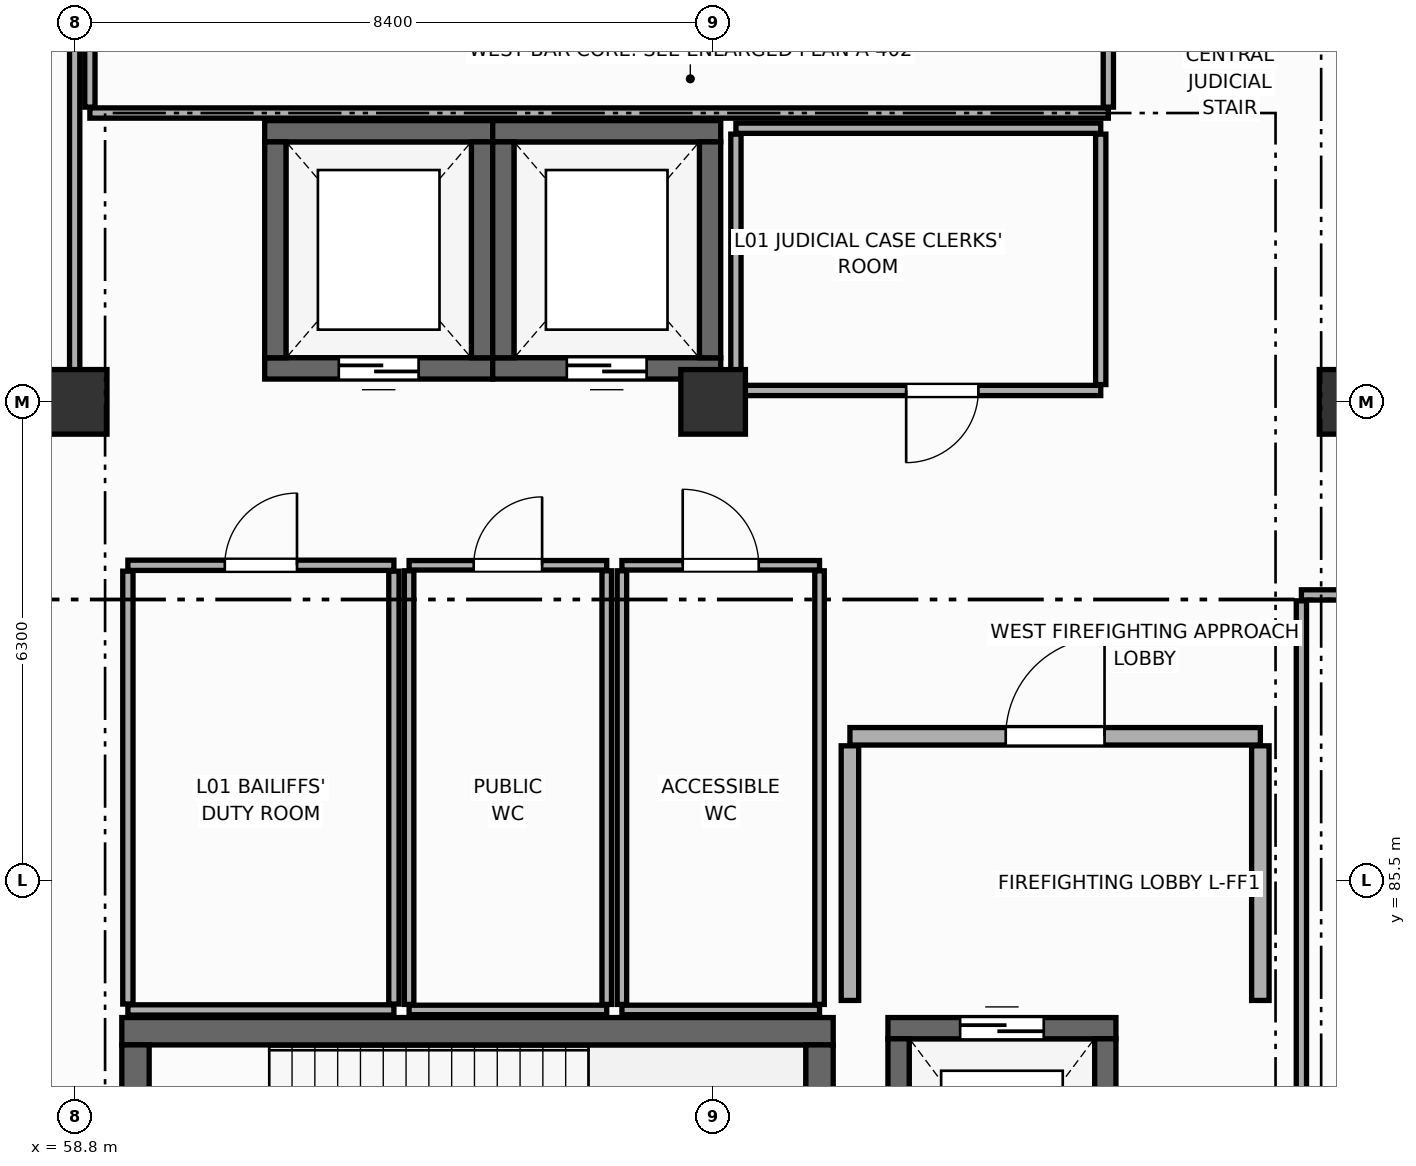
"""IFC4 building model, lengths in metres.
Left out: names, types, materials, properties, quantities, classifications, styles, units other than length and angle.
Written with IfcOpenShell. Run it as: python <this file> out.ifc"""

import sys

from ifc_helpers import new_model, si_unit, direction, frame, frame_2d, origin, origin_2d, place, context, subcontext, project, spatial, rectangle, extrude, element, fill, save


model = new_model("IFC4")
c1 = context("Model", 3, precision=1e-05, world=origin(), true_north=direction((0.0, 1.0)))
c2 = subcontext(c1, "Body", "Model", "MODEL_VIEW")
j1 = project(units=[si_unit("LENGTHUNIT", "METRE"), si_unit("PLANEANGLEUNIT", "RADIAN")], contexts=[c1])
p1 = place(None, origin())
s1 = spatial("IfcSite", under=j1, at=p1, CompositionType="ELEMENT")
p2 = place(p1, origin())
s2 = spatial("IfcBuilding", under=s1, at=p2, CompositionType="ELEMENT")
p3 = place(p2, origin())
s3 = spatial("IfcBuildingStorey", under=s2, at=p3, CompositionType="ELEMENT", Elevation=0.0)
for number, where, z_axis, x_axis in (
    (1, (58.8, 91.8, 0.0), (0.0, 0.0, 1.0), (1.0, 0.0, 0.0)),
    (2, (67.2, 91.8, 0.0), (0.0, 0.0, 1.0), (1.0, 0.0, 0.0)),
    (3, (75.6, 91.8, 0.0), (0.0, 0.0, 1.0), (1.0, 0.0, 0.0)),
):
    element("IfcColumn", number, at=place(p3, frame(where, z_axis=z_axis, x_axis=x_axis)), inside=s3, PredefinedType="COLUMN", context=c2, shape_type="SweptSolid", body=[
        extrude(rectangle(XDim=0.85, YDim=0.85, at=origin_2d()), origin(), (0.0, 0.0, 1.0), 5.4),
    ])
p4 = place(p3, frame((59.42, 83.52, 0.0), z_axis=(0.0, 0.0, 1.0), x_axis=(1.0, 0.0, 0.0)))
e4 = element("IfcWall", 4, at=p4, inside=s3, PredefinedType="SHEAR", context=c2, shape_type="SweptSolid", body=[
    extrude(rectangle(XDim=9.36, YDim=0.36, at=frame_2d((4.68, 0.0))), origin(), (0.0, 0.0, 1.0), 5.14),
])
p5 = place(p3, frame((59.6, 79.98, 0.0), z_axis=(0.0, 0.0, 1.0), x_axis=(0.0, 1.0, 0.0)))
e5 = element("IfcWall", 5, at=p5, inside=s3, PredefinedType="SHEAR", context=c2, shape_type="SweptSolid", body=[
    extrude(rectangle(XDim=3.36, YDim=0.36, at=frame_2d((1.68, 0.0))), origin(), (0.0, 0.0, 1.0), 5.14),
])
p6 = place(p5, frame((1.08, 0.0, 0.0)))
e6 = element("IfcOpeningElement", 6, at=p6, cuts=e5, PredefinedType="OPENING", context=c2, shape_type="SweptSolid", body=[
    extrude(rectangle(XDim=1.2, YDim=2.2, at=frame_2d((0.6, 1.1))), frame((0.0, 0.19, 0.0), z_axis=(0.0, -1.0, 0.0), x_axis=(1.0, 0.0, 0.0)), (0.0, 0.0, 1.0), 0.38),
])
p7 = place(p3, frame((68.6, 83.34, 0.0), z_axis=(0.0, 0.0, 1.0), x_axis=(0.0, -1.0, 0.0)))
e7 = element("IfcWall", 7, at=p7, inside=s3, PredefinedType="SHEAR", context=c2, shape_type="SweptSolid", body=[
    extrude(rectangle(XDim=3.36, YDim=0.36, at=frame_2d((1.68, 0.0))), origin(), (0.0, 0.0, 1.0), 5.14),
])
p8 = place(p3, frame((69.5, 83.56, 0.0), z_axis=(0.0, 0.0, 1.0), x_axis=(1.0, 0.0, 0.0)))
e8 = element("IfcWall", 8, at=p8, inside=s3, PredefinedType="SHEAR", context=c2, shape_type="SweptSolid", body=[
    extrude(rectangle(XDim=3.0, YDim=0.28, at=frame_2d((1.5, 0.0))), origin(), (0.0, 0.0, 1.0), 5.14),
])
p9 = place(p8, frame((0.95, 0.0, 0.0)))
e9 = element("IfcOpeningElement", 9, at=p9, cuts=e8, PredefinedType="OPENING", context=c2, shape_type="SweptSolid", body=[
    extrude(rectangle(XDim=1.1, YDim=2.2, at=frame_2d((0.55, 1.1))), frame((0.0, 0.15, 0.0), z_axis=(0.0, -1.0, 0.0), x_axis=(1.0, 0.0, 0.0)), (0.0, 0.0, 1.0), 0.3),
])
for number, where, z_axis, x_axis in (
    (10, (69.64, 80.18, 0.0), (0.0, 0.0, 1.0), (0.0, 1.0, 0.0)),
    (11, (72.36, 83.42, 0.0), (0.0, 0.0, 1.0), (0.0, -1.0, 0.0)),
):
    element("IfcWall", number, at=place(p3, frame(where, z_axis=z_axis, x_axis=x_axis)), inside=s3, PredefinedType="SHEAR", context=c2, shape_type="SweptSolid", body=[
        extrude(rectangle(XDim=3.24, YDim=0.28, at=frame_2d((1.62, 0.0))), origin(), (0.0, 0.0, 1.0), 5.14),
    ])
p10 = place(p3, frame((61.3, 95.36, 0.0), z_axis=(0.0, 0.0, 1.0), x_axis=(1.0, 0.0, 0.0)))
e12 = element("IfcWall", 12, at=p10, inside=s3, PredefinedType="SHEAR", context=c2, shape_type="SweptSolid", body=[
    extrude(rectangle(XDim=3.0, YDim=0.28, at=frame_2d((1.5, 0.0))), origin(), (0.0, 0.0, 1.0), 5.14),
])
p11 = place(p3, frame((64.3, 92.24, 0.0), z_axis=(0.0, 0.0, 1.0), x_axis=(-1.0, 0.0, 0.0)))
e13 = element("IfcWall", 13, at=p11, inside=s3, PredefinedType="SHEAR", context=c2, shape_type="SweptSolid", body=[
    extrude(rectangle(XDim=3.0, YDim=0.28, at=frame_2d((1.5, 0.0))), origin(), (0.0, 0.0, 1.0), 5.14),
])
p12 = place(p11, frame((0.975, 0.0, 0.0)))
e14 = element("IfcOpeningElement", 14, at=p12, cuts=e13, PredefinedType="OPENING", context=c2, shape_type="SweptSolid", body=[
    extrude(rectangle(XDim=1.05, YDim=2.2, at=frame_2d((0.525, 1.1))), frame((0.0, 0.15, 0.0), z_axis=(0.0, -1.0, 0.0), x_axis=(1.0, 0.0, 0.0)), (0.0, 0.0, 1.0), 0.3),
])
for number, where, z_axis, x_axis in (
    (15, (61.44, 92.38, 0.0), (0.0, 0.0, 1.0), (0.0, 1.0, 0.0)),
    (16, (64.16, 95.22, 0.0), (0.0, 0.0, 1.0), (0.0, -1.0, 0.0)),
):
    element("IfcWall", number, at=place(p3, frame(where, z_axis=z_axis, x_axis=x_axis)), inside=s3, PredefinedType="SHEAR", context=c2, shape_type="SweptSolid", body=[
        extrude(rectangle(XDim=2.84, YDim=0.28, at=frame_2d((1.42, 0.0))), origin(), (0.0, 0.0, 1.0), 5.14),
    ])
p13 = place(p3, frame((64.3, 95.36, 0.0), z_axis=(0.0, 0.0, 1.0), x_axis=(1.0, 0.0, 0.0)))
e17 = element("IfcWall", 17, at=p13, inside=s3, PredefinedType="SHEAR", context=c2, shape_type="SweptSolid", body=[
    extrude(rectangle(XDim=3.0, YDim=0.28, at=frame_2d((1.5, 0.0))), origin(), (0.0, 0.0, 1.0), 5.14),
])
p14 = place(p3, frame((67.3, 92.24, 0.0), z_axis=(0.0, 0.0, 1.0), x_axis=(-1.0, 0.0, 0.0)))
e18 = element("IfcWall", 18, at=p14, inside=s3, PredefinedType="SHEAR", context=c2, shape_type="SweptSolid", body=[
    extrude(rectangle(XDim=3.0, YDim=0.28, at=frame_2d((1.5, 0.0))), origin(), (0.0, 0.0, 1.0), 5.14),
])
p15 = place(p14, frame((0.975, 0.0, 0.0)))
e19 = element("IfcOpeningElement", 19, at=p15, cuts=e18, PredefinedType="OPENING", context=c2, shape_type="SweptSolid", body=[
    extrude(rectangle(XDim=1.05, YDim=2.2, at=frame_2d((0.525, 1.1))), frame((0.0, 0.15, 0.0), z_axis=(0.0, -1.0, 0.0), x_axis=(1.0, 0.0, 0.0)), (0.0, 0.0, 1.0), 0.3),
])
for number, where, z_axis, x_axis in (
    (20, (64.44, 92.38, 0.0), (0.0, 0.0, 1.0), (0.0, 1.0, 0.0)),
    (21, (67.16, 95.22, 0.0), (0.0, 0.0, 1.0), (0.0, -1.0, 0.0)),
):
    element("IfcWall", number, at=place(p3, frame(where, z_axis=z_axis, x_axis=x_axis)), inside=s3, PredefinedType="SHEAR", context=c2, shape_type="SweptSolid", body=[
        extrude(rectangle(XDim=2.84, YDim=0.28, at=frame_2d((1.42, 0.0))), origin(), (0.0, 0.0, 1.0), 5.14),
    ])
p16 = place(p3, frame((69.0, 87.4, 0.0), z_axis=(0.0, 0.0, 1.0), x_axis=(1.0, 0.0, 0.0)))
e22 = element("IfcWall", 22, at=p16, inside=s3, PredefinedType="STANDARD", context=c2, shape_type="SweptSolid", body=[
    extrude(rectangle(XDim=5.4, YDim=0.23, at=frame_2d((2.7, 0.0))), origin(), (0.0, 0.0, 1.0), 5.125),
])
p17 = place(p16, frame((2.05, 0.0, 0.0)))
e23 = element("IfcOpeningElement", 23, at=p17, cuts=e22, PredefinedType="OPENING", context=c2, shape_type="SweptSolid", body=[
    extrude(rectangle(XDim=1.3, YDim=2.2, at=frame_2d((0.65, 1.1))), frame((0.0, 0.125, 0.0), z_axis=(0.0, -1.0, 0.0), x_axis=(1.0, 0.0, 0.0)), (0.0, 0.0, 1.0), 0.25),
])
for number, where, z_axis, x_axis in (
    (24, (69.0, 83.925, 0.0), (0.0, 0.0, 1.0), (0.0, 1.0, 0.0)),
    (25, (74.4, 87.275, 0.0), (0.0, 0.0, 1.0), (0.0, -1.0, 0.0)),
):
    element("IfcWall", number, at=place(p3, frame(where, z_axis=z_axis, x_axis=x_axis)), inside=s3, PredefinedType="STANDARD", context=c2, shape_type="SweptSolid", body=[
        extrude(rectangle(XDim=3.35, YDim=0.23, at=frame_2d((1.675, 0.0))), origin(), (0.0, 0.0, 1.0), 5.125),
    ])
p18 = place(p3, frame((63.2, 89.65, 0.0), z_axis=(0.0, 0.0, 1.0), x_axis=(1.0, 0.0, 0.0)))
e26 = element("IfcWall", 26, at=p18, inside=s3, PredefinedType="PARTITIONING", context=c2, shape_type="SweptSolid", body=[
    extrude(rectangle(XDim=2.6, YDim=0.125, at=frame_2d((1.3, 0.0))), origin(), (0.0, 0.0, 1.0), 5.125),
])
p19 = place(p18, frame((0.85, 0.0, 0.0)))
e27 = element("IfcOpeningElement", 27, at=p19, cuts=e26, PredefinedType="OPENING", context=c2, shape_type="SweptSolid", body=[
    extrude(rectangle(XDim=0.9, YDim=2.1, at=frame_2d((0.45, 1.05))), frame((0.0, 0.073, 0.0), z_axis=(0.0, -1.0, 0.0), x_axis=(1.0, 0.0, 0.0)), (0.0, 0.0, 1.0), 0.145),
])
p20 = place(p3, frame((65.8, 83.8, 0.0), z_axis=(0.0, 0.0, 1.0), x_axis=(-1.0, 0.0, 0.0)))
e28 = element("IfcWall", 28, at=p20, inside=s3, PredefinedType="PARTITIONING", context=c2, shape_type="SweptSolid", body=[
    extrude(rectangle(XDim=2.6, YDim=0.125, at=frame_2d((1.3, 0.0))), origin(), (0.0, 0.0, 1.0), 5.125),
])
for number, where, z_axis, x_axis in (
    (29, (63.2, 83.873, 0.0), (0.0, 0.0, 1.0), (0.0, 1.0, 0.0)),
    (30, (65.8, 89.577, 0.0), (0.0, 0.0, 1.0), (0.0, -1.0, 0.0)),
):
    element("IfcWall", number, at=place(p3, frame(where, z_axis=z_axis, x_axis=x_axis)), inside=s3, PredefinedType="PARTITIONING", context=c2, shape_type="SweptSolid", body=[
        extrude(rectangle(XDim=5.705, YDim=0.125, at=frame_2d((2.853, 0.0))), origin(), (0.0, 0.0, 1.0), 5.125),
    ])
p21 = place(p3, frame((66.0, 89.65, 0.0), z_axis=(0.0, 0.0, 1.0), x_axis=(1.0, 0.0, 0.0)))
e31 = element("IfcWall", 31, at=p21, inside=s3, PredefinedType="PARTITIONING", context=c2, shape_type="SweptSolid", body=[
    extrude(rectangle(XDim=2.6, YDim=0.125, at=frame_2d((1.3, 0.0))), origin(), (0.0, 0.0, 1.0), 4.27),
])
p22 = place(p21, frame((0.8, 0.0, 0.0)))
e32 = element("IfcOpeningElement", 32, at=p22, cuts=e31, PredefinedType="OPENING", context=c2, shape_type="SweptSolid", body=[
    extrude(rectangle(XDim=1.0, YDim=2.1, at=frame_2d((0.5, 1.05))), frame((0.0, 0.073, 0.0), z_axis=(0.0, -1.0, 0.0), x_axis=(1.0, 0.0, 0.0)), (0.0, 0.0, 1.0), 0.145),
])
p23 = place(p3, frame((68.6, 83.8, 0.0), z_axis=(0.0, 0.0, 1.0), x_axis=(-1.0, 0.0, 0.0)))
e33 = element("IfcWall", 33, at=p23, inside=s3, PredefinedType="PARTITIONING", context=c2, shape_type="SweptSolid", body=[
    extrude(rectangle(XDim=2.6, YDim=0.125, at=frame_2d((1.3, 0.0))), origin(), (0.0, 0.0, 1.0), 4.27),
])
for number, where, z_axis, x_axis in (
    (34, (66.0, 83.873, 0.0), (0.0, 0.0, 1.0), (0.0, 1.0, 0.0)),
    (35, (68.6, 89.577, 0.0), (0.0, 0.0, 1.0), (0.0, -1.0, 0.0)),
):
    element("IfcWall", number, at=place(p3, frame(where, z_axis=z_axis, x_axis=x_axis)), inside=s3, PredefinedType="PARTITIONING", context=c2, shape_type="SweptSolid", body=[
        extrude(rectangle(XDim=5.705, YDim=0.125, at=frame_2d((2.853, 0.0))), origin(), (0.0, 0.0, 1.0), 5.125),
    ])
p24 = place(p3, frame((59.5, 89.65, 0.0), z_axis=(0.0, 0.0, 1.0), x_axis=(1.0, 0.0, 0.0)))
e36 = element("IfcWall", 36, at=p24, inside=s3, PredefinedType="PARTITIONING", context=c2, shape_type="SweptSolid", body=[
    extrude(rectangle(XDim=3.5, YDim=0.135, at=frame_2d((1.75, 0.0))), origin(), (0.0, 0.0, 1.0), 5.125),
])
p25 = place(p24, frame((1.275, 0.0, 0.0)))
e37 = element("IfcOpeningElement", 37, at=p25, cuts=e36, PredefinedType="OPENING", context=c2, shape_type="SweptSolid", body=[
    extrude(rectangle(XDim=0.95, YDim=2.15, at=frame_2d((0.475, 1.075))), frame((0.0, 0.077, 0.0), z_axis=(0.0, -1.0, 0.0), x_axis=(1.0, 0.0, 0.0)), (0.0, 0.0, 1.0), 0.155),
])
p26 = place(p3, frame((63.0, 83.8, 0.0), z_axis=(0.0, 0.0, 1.0), x_axis=(-1.0, 0.0, 0.0)))
e38 = element("IfcWall", 38, at=p26, inside=s3, PredefinedType="PARTITIONING", context=c2, shape_type="SweptSolid", body=[
    extrude(rectangle(XDim=3.5, YDim=0.135, at=frame_2d((1.75, 0.0))), origin(), (0.0, 0.0, 1.0), 5.125),
])
for number, where, z_axis, x_axis in (
    (39, (59.5, 83.877, 0.0), (0.0, 0.0, 1.0), (0.0, 1.0, 0.0)),
    (40, (63.0, 89.573, 0.0), (0.0, 0.0, 1.0), (0.0, -1.0, 0.0)),
):
    element("IfcWall", number, at=place(p3, frame(where, z_axis=z_axis, x_axis=x_axis)), inside=s3, PredefinedType="PARTITIONING", context=c2, shape_type="SweptSolid", body=[
        extrude(rectangle(XDim=5.695, YDim=0.135, at=frame_2d((2.848, 0.0))), origin(), (0.0, 0.0, 1.0), 5.125),
    ])
p27 = place(p3, frame((72.4, 95.6, 0.0), z_axis=(0.0, 0.0, 1.0), x_axis=(-1.0, 0.0, 0.0)))
e41 = element("IfcWall", 41, at=p27, inside=s3, PredefinedType="PARTITIONING", context=c2, shape_type="SweptSolid", body=[
    extrude(rectangle(XDim=13.4, YDim=0.135, at=frame_2d((6.7, 0.0))), origin(), (0.0, 0.0, 1.0), 4.27),
])
p28 = place(p3, frame((59.0, 95.677, 0.0), z_axis=(0.0, 0.0, 1.0), x_axis=(0.0, 1.0, 0.0)))
e42 = element("IfcWall", 42, at=p28, inside=s3, PredefinedType="PARTITIONING", context=c2, shape_type="SweptSolid", body=[
    extrude(rectangle(XDim=7.845, YDim=0.135, at=frame_2d((3.922, 0.0))), origin(), (0.0, 0.0, 1.0), 4.27),
])
p29 = place(p3, frame((72.4, 103.522, 0.0), z_axis=(0.0, 0.0, 1.0), x_axis=(0.0, -1.0, 0.0)))
e43 = element("IfcWall", 43, at=p29, inside=s3, PredefinedType="PARTITIONING", context=c2, shape_type="SweptSolid", body=[
    extrude(rectangle(XDim=7.845, YDim=0.135, at=frame_2d((3.922, 0.0))), origin(), (0.0, 0.0, 1.0), 4.52),
])
p30 = place(p29, frame((2.518, 0.0, 0.0)))
e44 = element("IfcOpeningElement", 44, at=p30, cuts=e43, PredefinedType="OPENING", context=c2, shape_type="SweptSolid", body=[
    extrude(rectangle(XDim=0.95, YDim=2.15, at=frame_2d((0.475, 1.075))), frame((0.0, 0.077, 0.0), z_axis=(0.0, -1.0, 0.0), x_axis=(1.0, 0.0, 0.0)), (0.0, 0.0, 1.0), 0.155),
])
p31 = place(p3, frame((67.5, 95.4, 0.0), z_axis=(0.0, 0.0, 1.0), x_axis=(1.0, 0.0, 0.0)))
e45 = element("IfcWall", 45, at=p31, inside=s3, PredefinedType="PARTITIONING", context=c2, shape_type="SweptSolid", body=[
    extrude(rectangle(XDim=4.8, YDim=0.135, at=frame_2d((2.4, 0.0))), origin(), (0.0, 0.0, 1.0), 4.27),
])
p32 = place(p3, frame((72.3, 91.95, 0.0), z_axis=(0.0, 0.0, 1.0), x_axis=(-1.0, 0.0, 0.0)))
e46 = element("IfcWall", 46, at=p32, inside=s3, PredefinedType="PARTITIONING", context=c2, shape_type="SweptSolid", body=[
    extrude(rectangle(XDim=4.8, YDim=0.135, at=frame_2d((2.4, 0.0))), origin(), (0.0, 0.0, 1.0), 4.27),
])
p33 = place(p32, frame((1.61, 0.0, 0.0)))
e47 = element("IfcOpeningElement", 47, at=p33, cuts=e46, PredefinedType="OPENING", context=c2, shape_type="SweptSolid", body=[
    extrude(rectangle(XDim=0.95, YDim=2.15, at=frame_2d((0.475, 1.075))), frame((0.0, 0.077, 0.0), z_axis=(0.0, -1.0, 0.0), x_axis=(1.0, 0.0, 0.0)), (0.0, 0.0, 1.0), 0.155),
])
p34 = place(p3, frame((67.5, 92.028, 0.0), z_axis=(0.0, 0.0, 1.0), x_axis=(0.0, 1.0, 0.0)))
e48 = element("IfcWall", 48, at=p34, inside=s3, PredefinedType="PARTITIONING", context=c2, shape_type="SweptSolid", body=[
    extrude(rectangle(XDim=3.295, YDim=0.135, at=frame_2d((1.647, 0.0))), origin(), (0.0, 0.0, 1.0), 4.27),
])
p35 = place(p3, frame((72.3, 95.323, 0.0), z_axis=(0.0, 0.0, 1.0), x_axis=(0.0, -1.0, 0.0)))
e49 = element("IfcWall", 49, at=p35, inside=s3, PredefinedType="PARTITIONING", context=c2, shape_type="SweptSolid", body=[
    extrude(rectangle(XDim=3.295, YDim=0.135, at=frame_2d((1.647, 0.0))), origin(), (0.0, 0.0, 1.0), 4.47),
])
p36 = place(p3, frame((74.94, 89.26, 0.0), z_axis=(0.0, 0.0, 1.0), x_axis=(1.0, 0.0, 0.0)))
e50 = element("IfcWall", 50, at=p36, inside=s3, PredefinedType="PARTITIONING", context=c2, shape_type="SweptSolid", body=[
    extrude(rectangle(XDim=4.72, YDim=0.135, at=frame_2d((2.36, 0.0))), origin(), (0.0, 0.0, 1.0), 4.27),
])
p37 = place(p36, frame((2.192, 0.0, 0.0)))
e51 = element("IfcOpeningElement", 51, at=p37, cuts=e50, PredefinedType="OPENING", context=c2, shape_type="SweptSolid", body=[
    extrude(rectangle(XDim=0.95, YDim=2.15, at=frame_2d((0.475, 1.075))), frame((0.0, 0.077, 0.0), z_axis=(0.0, -1.0, 0.0), x_axis=(1.0, 0.0, 0.0)), (0.0, 0.0, 1.0), 0.155),
])
p38 = place(p3, frame((74.94, 79.817, 0.0), z_axis=(0.0, 0.0, 1.0), x_axis=(0.0, 1.0, 0.0)))
e52 = element("IfcWall", 52, at=p38, inside=s3, PredefinedType="PARTITIONING", context=c2, shape_type="SweptSolid", body=[
    extrude(rectangle(XDim=9.365, YDim=0.135, at=frame_2d((4.683, 0.0))), origin(), (0.0, 0.0, 1.0), 5.125),
])
p39 = place(p3, frame((58.8, 91.95, 0.0), z_axis=(0.0, 0.0, 1.0), x_axis=(-1.0, 0.0, 0.0)))
e53 = element("IfcWall", 53, at=p39, inside=s3, PredefinedType="PARTITIONING", context=c2, shape_type="SweptSolid", body=[
    extrude(rectangle(XDim=9.5, YDim=0.135, at=frame_2d((4.75, 0.0))), origin(), (0.0, 0.0, 1.0), 4.17),
])
p40 = place(p39, frame((3.073, 0.0, 0.0)))
e54 = element("IfcOpeningElement", 54, at=p40, cuts=e53, PredefinedType="OPENING", context=c2, shape_type="SweptSolid", body=[
    extrude(rectangle(XDim=1.02, YDim=2.15, at=frame_2d((0.51, 1.075))), frame((0.0, 0.077, 0.0), z_axis=(0.0, -1.0, 0.0), x_axis=(1.0, 0.0, 0.0)), (0.0, 0.0, 1.0), 0.155),
])
p41 = place(p3, frame((58.8, 99.423, 0.0), z_axis=(0.0, 0.0, 1.0), x_axis=(0.0, -1.0, 0.0)))
e55 = element("IfcWall", 55, at=p41, inside=s3, PredefinedType="PARTITIONING", context=c2, shape_type="SweptSolid", body=[
    extrude(rectangle(XDim=7.395, YDim=0.135, at=frame_2d((3.698, 0.0))), origin(), (0.0, 0.0, 1.0), 4.27),
])
p42 = place(p9, origin())
e56 = element("IfcDoor", 56, at=p42, inside=s3, OperationType="DOUBLE_DOOR_SLIDING", PredefinedType="DOOR", context=c2, shape_type="SweptSolid", body=[
    extrude(rectangle(XDim=1.1, YDim=2.2, at=frame_2d((0.55, 1.1))), frame((0.0, 0.025, 0.0), z_axis=(0.0, -1.0, 0.0), x_axis=(1.0, 0.0, 0.0)), (0.0, 0.0, 1.0), 0.05),
])
fill(e9, e56)
p43 = place(p12, origin())
e57 = element("IfcDoor", 57, at=p43, inside=s3, OperationType="DOUBLE_DOOR_SLIDING", PredefinedType="DOOR", context=c2, shape_type="SweptSolid", body=[
    extrude(rectangle(XDim=1.05, YDim=2.2, at=frame_2d((0.525, 1.1))), frame((0.0, 0.025, 0.0), z_axis=(0.0, -1.0, 0.0), x_axis=(1.0, 0.0, 0.0)), (0.0, 0.0, 1.0), 0.05),
])
fill(e14, e57)
p44 = place(p15, origin())
e58 = element("IfcDoor", 58, at=p44, inside=s3, OperationType="DOUBLE_DOOR_SLIDING", PredefinedType="DOOR", context=c2, shape_type="SweptSolid", body=[
    extrude(rectangle(XDim=1.05, YDim=2.2, at=frame_2d((0.525, 1.1))), frame((0.0, 0.025, 0.0), z_axis=(0.0, -1.0, 0.0), x_axis=(1.0, 0.0, 0.0)), (0.0, 0.0, 1.0), 0.05),
])
fill(e19, e58)
p45 = place(p17, origin())
e59 = element("IfcDoor", 59, at=p45, inside=s3, OperationType="SINGLE_SWING_RIGHT", PredefinedType="DOOR", context=c2, shape_type="SweptSolid", body=[
    extrude(rectangle(XDim=1.3, YDim=2.2, at=frame_2d((0.65, 1.1))), frame((0.0, 0.025, 0.0), z_axis=(0.0, -1.0, 0.0), x_axis=(1.0, 0.0, 0.0)), (0.0, 0.0, 1.0), 0.05),
])
fill(e23, e59)
p46 = place(p19, origin())
e60 = element("IfcDoor", 60, at=p46, inside=s3, OperationType="SINGLE_SWING_RIGHT", PredefinedType="DOOR", context=c2, shape_type="SweptSolid", body=[
    extrude(rectangle(XDim=0.9, YDim=2.1, at=frame_2d((0.45, 1.05))), frame((0.0, 0.025, 0.0), z_axis=(0.0, -1.0, 0.0), x_axis=(1.0, 0.0, 0.0)), (0.0, 0.0, 1.0), 0.05),
])
fill(e27, e60)
p47 = place(p22, origin())
e61 = element("IfcDoor", 61, at=p47, inside=s3, OperationType="SINGLE_SWING_LEFT", PredefinedType="DOOR", context=c2, shape_type="SweptSolid", body=[
    extrude(rectangle(XDim=1.0, YDim=2.1, at=frame_2d((0.5, 1.05))), frame((0.0, 0.025, 0.0), z_axis=(0.0, -1.0, 0.0), x_axis=(1.0, 0.0, 0.0)), (0.0, 0.0, 1.0), 0.05),
])
fill(e32, e61)
p48 = place(p25, origin())
e62 = element("IfcDoor", 62, at=p48, inside=s3, OperationType="SINGLE_SWING_RIGHT", PredefinedType="DOOR", context=c2, shape_type="SweptSolid", body=[
    extrude(rectangle(XDim=0.95, YDim=2.15, at=frame_2d((0.475, 1.075))), frame((0.0, 0.025, 0.0), z_axis=(0.0, -1.0, 0.0), x_axis=(1.0, 0.0, 0.0)), (0.0, 0.0, 1.0), 0.05),
])
fill(e37, e62)
p49 = place(p33, origin())
e63 = element("IfcDoor", 63, at=p49, inside=s3, OperationType="SINGLE_SWING_RIGHT", PredefinedType="DOOR", context=c2, shape_type="SweptSolid", body=[
    extrude(rectangle(XDim=0.95, YDim=2.15, at=frame_2d((0.475, 1.075))), frame((0.0, 0.025, 0.0), z_axis=(0.0, -1.0, 0.0), x_axis=(1.0, 0.0, 0.0)), (0.0, 0.0, 1.0), 0.05),
])
fill(e47, e63)
save(model, sys.argv[1])
